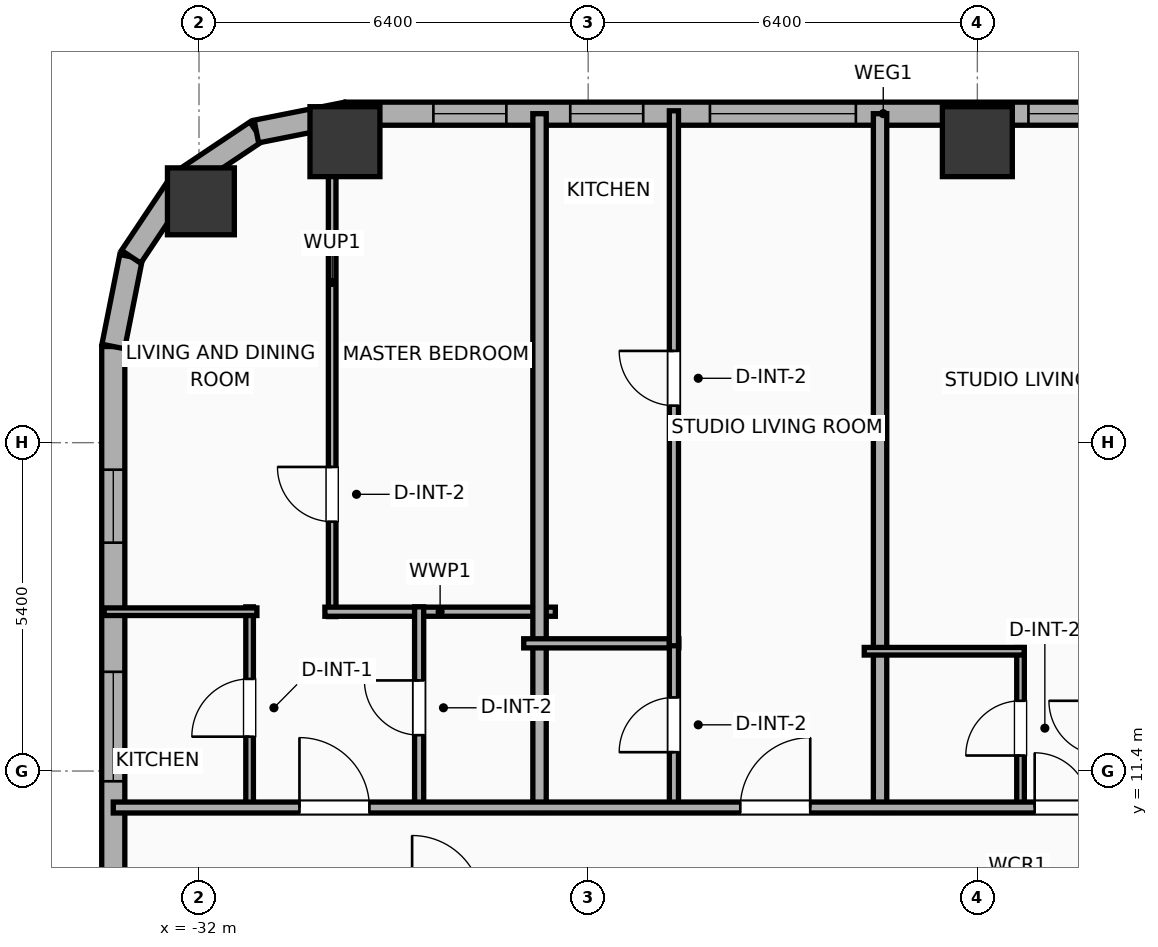
"""IFC4 building model, lengths in metres.
Left out: names, types, materials, properties, quantities, classifications, styles, units other than length and angle.
Written with IfcOpenShell. Run it as: python <this file> out.ifc"""

import sys

from ifc_helpers import new_model, si_unit, direction, frame, frame_2d, origin, origin_2d, place, context, subcontext, project, spatial, rectangle, hollow_rectangle, hollow_circle, extrude, element, fill, save


model = new_model("IFC4")
c1 = context("Model", 3, precision=1e-05, world=origin(), true_north=direction((0.0, 1.0)))
c2 = subcontext(c1, "Body", "Model", "MODEL_VIEW")
j1 = project(units=[si_unit("LENGTHUNIT", "METRE"), si_unit("PLANEANGLEUNIT", "RADIAN")], contexts=[c1])
p1 = place(None, origin())
s1 = spatial("IfcSite", under=j1, at=p1, CompositionType="ELEMENT")
p2 = place(p1, origin())
s2 = spatial("IfcBuilding", under=s1, at=p2, CompositionType="ELEMENT")
p3 = place(p2, frame((0.0, 0.0, 61.1)))
s3 = spatial("IfcBuildingStorey", under=s2, at=p3, CompositionType="ELEMENT", Elevation=61.1)
for number, where, z_axis, x_axis in (
    (1, (-19.2, 21.75, 0.0), (0.0, 0.0, 1.0), (1.0, 0.0, 0.0)),
    (2, (-29.6, 21.75, 0.0), (0.0, 0.0, 1.0), (1.0, 0.0, 0.0)),
):
    element("IfcColumn", number, at=place(p3, frame(where, z_axis=z_axis, x_axis=x_axis)), inside=s3, PredefinedType="COLUMN", context=c2, shape_type="SweptSolid", body=[
        extrude(hollow_rectangle(XDim=1.15, YDim=1.15, WallThickness=0.04, at=origin_2d()), origin(), (0.0, 0.0, 1.0), 3.9),
    ])
p4 = place(p3, frame((-31.969, 20.769, 0.0), z_axis=(0.0, 0.0, 1.0), x_axis=(1.0, 0.0, 0.0)))
e3 = element("IfcColumn", 3, at=p4, inside=s3, PredefinedType="COLUMN", context=c2, shape_type="SweptSolid", body=[
    extrude(hollow_circle(Radius=0.55, WallThickness=0.036, at=origin_2d()), origin(), (0.0, 0.0, 1.0), 3.9),
])
p5 = place(p3, frame((-33.41, 5.882, 0.0), z_axis=(0.0, 0.0, 1.0), x_axis=(0.0, 1.0, 0.0)))
e4 = element("IfcWall", 4, at=p5, inside=s3, PredefinedType="ELEMENTEDWALL", context=c2, shape_type="SweptSolid", body=[
    extrude(rectangle(XDim=12.499, YDim=0.38, at=frame_2d((6.25, 0.0))), origin(), (0.0, 0.0, 1.0), 3.65),
])
p6 = place(p5, frame((5.35, 0.0, 0.75)))
e5 = element("IfcOpeningElement", 5, at=p6, cuts=e4, PredefinedType="OPENING", context=c2, shape_type="SweptSolid", body=[
    extrude(rectangle(XDim=1.8, YDim=2.1, at=frame_2d((0.9, 1.05))), frame((0.0, 0.2, 0.0), z_axis=(0.0, -1.0, 0.0), x_axis=(1.0, 0.0, 0.0)), (0.0, 0.0, 1.0), 0.4),
])
p7 = place(p5, frame((9.274, 0.0, 0.75)))
e6 = element("IfcOpeningElement", 6, at=p7, cuts=e4, PredefinedType="OPENING", context=c2, shape_type="SweptSolid", body=[
    extrude(rectangle(XDim=1.2, YDim=2.05, at=frame_2d((0.6, 1.025))), frame((0.0, 0.2, 0.0), z_axis=(0.0, -1.0, 0.0), x_axis=(1.0, 0.0, 0.0)), (0.0, 0.0, 1.0), 0.4),
])
p8 = place(p3, frame((-33.41, 18.381, 0.0), z_axis=(0.0, 0.0, 1.0), x_axis=(0.195086038585, 0.980786132421, 0.0)))
e7 = element("IfcWall", 7, at=p8, inside=s3, PredefinedType="ELEMENTEDWALL", context=c2, shape_type="SweptSolid", body=[
    extrude(rectangle(XDim=1.504, YDim=0.38, at=frame_2d((0.752, 0.0))), origin(), (0.0, 0.0, 1.0), 3.65),
])
p9 = place(p3, frame((-33.116, 19.857, 0.0), z_axis=(0.0, 0.0, 1.0), x_axis=(0.555572577804, 0.831468045563, 0.0)))
e8 = element("IfcWall", 8, at=p9, inside=s3, PredefinedType="ELEMENTEDWALL", context=c2, shape_type="SweptSolid", body=[
    extrude(rectangle(XDim=1.485, YDim=0.38, at=frame_2d((0.742, 0.0))), origin(), (0.0, 0.0, 1.0), 3.65),
])
p10 = place(p3, frame((-32.292, 21.091, 0.0), z_axis=(0.0, 0.0, 1.0), x_axis=(0.831442848281, 0.555610286119, 0.0)))
e9 = element("IfcWall", 9, at=p10, inside=s3, PredefinedType="ELEMENTEDWALL", context=c2, shape_type="SweptSolid", body=[
    extrude(rectangle(XDim=1.485, YDim=0.38, at=frame_2d((0.743, 0.0))), origin(), (0.0, 0.0, 1.0), 3.65),
])
p11 = place(p3, frame((-31.057, 21.917, 0.0), z_axis=(0.0, 0.0, 1.0), x_axis=(0.980786132421, 0.195086038585, 0.0)))
e10 = element("IfcWall", 10, at=p11, inside=s3, PredefinedType="ELEMENTEDWALL", context=c2, shape_type="SweptSolid", body=[
    extrude(rectangle(XDim=1.504, YDim=0.38, at=frame_2d((0.752, 0.0))), origin(), (0.0, 0.0, 1.0), 3.65),
])
p12 = place(p3, frame((-29.581, 22.21, 0.0), z_axis=(0.0, 0.0, 1.0), x_axis=(1.0, 0.0, 0.0)))
e11 = element("IfcWall", 11, at=p12, inside=s3, PredefinedType="ELEMENTEDWALL", context=c2, shape_type="SweptSolid", body=[
    extrude(rectangle(XDim=17.667, YDim=0.38, at=frame_2d((8.833, 0.0))), origin(), (0.0, 0.0, 1.0), 3.65),
])
p13 = place(p12, frame((5.984, 0.0, 0.75)))
e12 = element("IfcOpeningElement", 12, at=p13, cuts=e11, PredefinedType="OPENING", context=c2, shape_type="SweptSolid", body=[
    extrude(rectangle(XDim=2.4, YDim=2.1, at=frame_2d((1.2, 1.05))), frame((0.0, 0.2, 0.0), z_axis=(0.0, -1.0, 0.0), x_axis=(1.0, 0.0, 0.0)), (0.0, 0.0, 1.0), 0.4),
])
p14 = place(p12, frame((1.436, 0.0, 0.75)))
e13 = element("IfcOpeningElement", 13, at=p14, cuts=e11, PredefinedType="OPENING", context=c2, shape_type="SweptSolid", body=[
    extrude(rectangle(XDim=1.2, YDim=2.05, at=frame_2d((0.6, 1.025))), frame((0.0, 0.2, 0.0), z_axis=(0.0, -1.0, 0.0), x_axis=(1.0, 0.0, 0.0)), (0.0, 0.0, 1.0), 0.4),
])
p15 = place(p12, frame((3.686, 0.0, 0.75)))
e14 = element("IfcOpeningElement", 14, at=p15, cuts=e11, PredefinedType="OPENING", context=c2, shape_type="SweptSolid", body=[
    extrude(rectangle(XDim=1.2, YDim=2.05, at=frame_2d((0.6, 1.025))), frame((0.0, 0.2, 0.0), z_axis=(0.0, -1.0, 0.0), x_axis=(1.0, 0.0, 0.0)), (0.0, 0.0, 1.0), 0.4),
])
p16 = place(p12, frame((11.221, 0.0, 0.75)))
e15 = element("IfcOpeningElement", 15, at=p16, cuts=e11, PredefinedType="OPENING", context=c2, shape_type="SweptSolid", body=[
    extrude(rectangle(XDim=1.2, YDim=2.05, at=frame_2d((0.6, 1.025))), frame((0.0, 0.2, 0.0), z_axis=(0.0, -1.0, 0.0), x_axis=(1.0, 0.0, 0.0)), (0.0, 0.0, 1.0), 0.4),
])
p17 = place(p12, frame((14.886, 0.0, 0.75)))
e16 = element("IfcOpeningElement", 16, at=p17, cuts=e11, PredefinedType="OPENING", context=c2, shape_type="SweptSolid", body=[
    extrude(rectangle(XDim=1.2, YDim=2.05, at=frame_2d((0.6, 1.025))), frame((0.0, 0.2, 0.0), z_axis=(0.0, -1.0, 0.0), x_axis=(1.0, 0.0, 0.0)), (0.0, 0.0, 1.0), 0.4),
])
p18 = place(p3, frame((-29.81, 13.94, 0.0), z_axis=(0.0, 0.0, 1.0), x_axis=(0.0, 1.0, 0.0)))
e17 = element("IfcWall", 17, at=p18, inside=s3, PredefinedType="PARTITIONING", context=c2, shape_type="SweptSolid", body=[
    extrude(rectangle(XDim=8.377, YDim=0.125, at=frame_2d((4.189, 0.0))), origin(), (0.0, 0.0, 1.0), 3.65),
])
p19 = place(p18, frame((1.561, 0.0, 0.0)))
e18 = element("IfcOpeningElement", 18, at=p19, cuts=e17, PredefinedType="OPENING", context=c2, shape_type="SweptSolid", body=[
    extrude(rectangle(XDim=0.9, YDim=2.05, at=frame_2d((0.45, 1.025))), frame((0.0, 0.073, 0.0), z_axis=(0.0, -1.0, 0.0), x_axis=(1.0, 0.0, 0.0)), (0.0, 0.0, 1.0), 0.145),
])
p20 = place(p3, frame((-29.93, 14.02, 0.0), z_axis=(0.0, 0.0, 1.0), x_axis=(1.0, 0.0, 0.0)))
e19 = element("IfcWall", 19, at=p20, inside=s3, PredefinedType="PLUMBINGWALL", context=c2, shape_type="SweptSolid", body=[
    extrude(rectangle(XDim=3.79, YDim=0.15, at=frame_2d((1.895, 0.0))), origin(), (0.0, 0.0, 1.0), 3.65),
])
p21 = place(p3, frame((-31.168, 10.78, 0.0), z_axis=(0.0, 0.0, 1.0), x_axis=(0.0, 1.0, 0.0)))
e20 = element("IfcWall", 20, at=p21, inside=s3, PredefinedType="PARTITIONING", context=c2, shape_type="SweptSolid", body=[
    extrude(rectangle(XDim=3.32, YDim=0.125, at=frame_2d((1.66, 0.0))), origin(), (0.0, 0.0, 1.0), 3.65),
])
p22 = place(p21, frame((1.185, 0.0, 0.0)))
e21 = element("IfcOpeningElement", 21, at=p22, cuts=e20, PredefinedType="OPENING", context=c2, shape_type="SweptSolid", body=[
    extrude(rectangle(XDim=0.95, YDim=2.05, at=frame_2d((0.475, 1.025))), frame((0.0, 0.073, 0.0), z_axis=(0.0, -1.0, 0.0), x_axis=(1.0, 0.0, 0.0)), (0.0, 0.0, 1.0), 0.145),
])
p23 = place(p3, frame((-33.56, 14.02, 0.0), z_axis=(0.0, 0.0, 1.0), x_axis=(1.0, 0.0, 0.0)))
e22 = element("IfcWall", 22, at=p23, inside=s3, PredefinedType="PARTITIONING", context=c2, shape_type="SweptSolid", body=[
    extrude(rectangle(XDim=2.512, YDim=0.125, at=frame_2d((1.256, 0.0))), origin(), (0.0, 0.0, 1.0), 3.65),
])
p24 = place(p3, frame((-28.38, 10.78, 0.0), z_axis=(0.0, 0.0, 1.0), x_axis=(0.0, 1.0, 0.0)))
e23 = element("IfcWall", 23, at=p24, inside=s3, PredefinedType="PLUMBINGWALL", context=c2, shape_type="SweptSolid", body=[
    extrude(rectangle(XDim=3.32, YDim=0.15, at=frame_2d((1.66, 0.0))), origin(), (0.0, 0.0, 1.0), 3.65),
])
p25 = place(p24, frame((1.21, 0.0, 0.0)))
e24 = element("IfcOpeningElement", 24, at=p25, cuts=e23, PredefinedType="OPENING", context=c2, shape_type="SweptSolid", body=[
    extrude(rectangle(XDim=0.9, YDim=2.05, at=frame_2d((0.45, 1.025))), frame((0.0, 0.085, 0.0), z_axis=(0.0, -1.0, 0.0), x_axis=(1.0, 0.0, 0.0)), (0.0, 0.0, 1.0), 0.17),
])
p26 = place(p3, frame((-26.4, 10.72, 0.0), z_axis=(0.0, 0.0, 1.0), x_axis=(0.0, 1.0, 0.0)))
e25 = element("IfcWall", 25, at=p26, inside=s3, PredefinedType="PARTITIONING", context=c2, shape_type="SweptSolid", body=[
    extrude(rectangle(XDim=11.49, YDim=0.22, at=frame_2d((5.745, 0.0))), origin(), (0.0, 0.0, 1.0), 3.65),
])
p27 = place(p3, frame((-26.66, 13.5, 0.0), z_axis=(0.0, 0.0, 1.0), x_axis=(1.0, 0.0, 0.0)))
e26 = element("IfcWall", 26, at=p27, inside=s3, PredefinedType="PLUMBINGWALL", context=c2, shape_type="SweptSolid", body=[
    extrude(rectangle(XDim=2.55, YDim=0.15, at=frame_2d((1.275, 0.0))), origin(), (0.0, 0.0, 1.0), 3.65),
])
p28 = place(p3, frame((-24.19, 10.78, 0.0), z_axis=(0.0, 0.0, 1.0), x_axis=(0.0, 1.0, 0.0)))
e27 = element("IfcWall", 27, at=p28, inside=s3, PredefinedType="PLUMBINGWALL", context=c2, shape_type="SweptSolid", body=[
    extrude(rectangle(XDim=2.76, YDim=0.15, at=frame_2d((1.38, 0.0))), origin(), (0.0, 0.0, 1.0), 3.65),
])
p29 = place(p28, frame((0.93, 0.0, 0.0)))
e28 = element("IfcOpeningElement", 28, at=p29, cuts=e27, PredefinedType="OPENING", context=c2, shape_type="SweptSolid", body=[
    extrude(rectangle(XDim=0.9, YDim=2.05, at=frame_2d((0.45, 1.025))), frame((0.0, 0.085, 0.0), z_axis=(0.0, -1.0, 0.0), x_axis=(1.0, 0.0, 0.0)), (0.0, 0.0, 1.0), 0.17),
])
p30 = place(p3, frame((-24.19, 13.46, 0.0), z_axis=(0.0, 0.0, 1.0), x_axis=(0.0, 1.0, 0.0)))
e29 = element("IfcWall", 29, at=p30, inside=s3, PredefinedType="PLUMBINGWALL", context=c2, shape_type="SweptSolid", body=[
    extrude(rectangle(XDim=8.798, YDim=0.15, at=frame_2d((4.399, 0.0))), origin(), (0.0, 0.0, 1.0), 3.65),
])
p31 = place(p30, frame((3.949, 0.0, 0.0)))
e30 = element("IfcOpeningElement", 30, at=p31, cuts=e29, PredefinedType="OPENING", context=c2, shape_type="SweptSolid", body=[
    extrude(rectangle(XDim=0.9, YDim=2.05, at=frame_2d((0.45, 1.025))), frame((0.0, 0.085, 0.0), z_axis=(0.0, -1.0, 0.0), x_axis=(1.0, 0.0, 0.0)), (0.0, 0.0, 1.0), 0.17),
])
p32 = place(p3, frame((-20.8, 10.72, 0.0), z_axis=(0.0, 0.0, 1.0), x_axis=(0.0, 1.0, 0.0)))
e31 = element("IfcWall", 31, at=p32, inside=s3, PredefinedType="PARTITIONING", context=c2, shape_type="SweptSolid", body=[
    extrude(rectangle(XDim=11.49, YDim=0.22, at=frame_2d((5.745, 0.0))), origin(), (0.0, 0.0, 1.0), 3.65),
])
p33 = place(p3, frame((-18.49, 10.78, 0.0), z_axis=(0.0, 0.0, 1.0), x_axis=(0.0, 1.0, 0.0)))
e32 = element("IfcWall", 32, at=p33, inside=s3, PredefinedType="PARTITIONING", context=c2, shape_type="SweptSolid", body=[
    extrude(rectangle(XDim=2.65, YDim=0.125, at=frame_2d((1.325, 0.0))), origin(), (0.0, 0.0, 1.0), 3.65),
])
p34 = place(p33, frame((0.875, 0.0, 0.0)))
e33 = element("IfcOpeningElement", 33, at=p34, cuts=e32, PredefinedType="OPENING", context=c2, shape_type="SweptSolid", body=[
    extrude(rectangle(XDim=0.9, YDim=2.05, at=frame_2d((0.45, 1.025))), frame((0.0, 0.073, 0.0), z_axis=(0.0, -1.0, 0.0), x_axis=(1.0, 0.0, 0.0)), (0.0, 0.0, 1.0), 0.145),
])
p35 = place(p3, frame((-21.06, 13.37, 0.0), z_axis=(0.0, 0.0, 1.0), x_axis=(1.0, 0.0, 0.0)))
e34 = element("IfcWall", 34, at=p35, inside=s3, PredefinedType="PARTITIONING", context=c2, shape_type="SweptSolid", body=[
    extrude(rectangle(XDim=2.63, YDim=0.125, at=frame_2d((1.315, 0.0))), origin(), (0.0, 0.0, 1.0), 3.65),
])
p36 = place(p3, frame((-33.41, 10.8, 0.0), z_axis=(0.0, 0.0, 1.0), x_axis=(1.0, 0.0, 0.0)))
e35 = element("IfcWall", 35, at=p36, inside=s3, PredefinedType="PARTITIONING", context=c2, shape_type="SweptSolid", body=[
    extrude(rectangle(XDim=59.62, YDim=0.18, at=frame_2d((29.81, 0.0))), origin(), (0.0, 0.0, 1.0), 3.65),
])
p37 = place(p36, frame((3.062, 0.0, 0.0)))
e36 = element("IfcOpeningElement", 36, at=p37, cuts=e35, PredefinedType="OPENING", context=c2, shape_type="SweptSolid", body=[
    extrude(rectangle(XDim=1.15, YDim=2.05, at=frame_2d((0.575, 1.025))), frame((0.0, 0.1, 0.0), z_axis=(0.0, -1.0, 0.0), x_axis=(1.0, 0.0, 0.0)), (0.0, 0.0, 1.0), 0.2),
])
p38 = place(p36, frame((10.312, 0.0, 0.0)))
e37 = element("IfcOpeningElement", 37, at=p38, cuts=e35, PredefinedType="OPENING", context=c2, shape_type="SweptSolid", body=[
    extrude(rectangle(XDim=1.15, YDim=2.05, at=frame_2d((0.575, 1.025))), frame((0.0, 0.1, 0.0), z_axis=(0.0, -1.0, 0.0), x_axis=(1.0, 0.0, 0.0)), (0.0, 0.0, 1.0), 0.2),
])
p39 = place(p36, frame((15.153, 0.0, 0.0)))
e38 = element("IfcOpeningElement", 38, at=p39, cuts=e35, PredefinedType="OPENING", context=c2, shape_type="SweptSolid", body=[
    extrude(rectangle(XDim=0.9, YDim=2.05, at=frame_2d((0.45, 1.025))), frame((0.0, 0.1, 0.0), z_axis=(0.0, -1.0, 0.0), x_axis=(1.0, 0.0, 0.0)), (0.0, 0.0, 1.0), 0.2),
])
p40 = place(p36, frame((21.508, 0.0, 0.0)))
e39 = element("IfcOpeningElement", 39, at=p40, cuts=e35, PredefinedType="OPENING", context=c2, shape_type="SweptSolid", body=[
    extrude(rectangle(XDim=1.15, YDim=2.05, at=frame_2d((0.575, 1.025))), frame((0.0, 0.1, 0.0), z_axis=(0.0, -1.0, 0.0), x_axis=(1.0, 0.0, 0.0)), (0.0, 0.0, 1.0), 0.2),
])
p41 = place(p36, frame((26.355, 0.0, 0.0)))
e40 = element("IfcOpeningElement", 40, at=p41, cuts=e35, PredefinedType="OPENING", context=c2, shape_type="SweptSolid", body=[
    extrude(rectangle(XDim=0.9, YDim=2.05, at=frame_2d((0.45, 1.025))), frame((0.0, 0.1, 0.0), z_axis=(0.0, -1.0, 0.0), x_axis=(1.0, 0.0, 0.0)), (0.0, 0.0, 1.0), 0.2),
])
p42 = place(p36, frame((32.753, 0.0, 0.0)))
e41 = element("IfcOpeningElement", 41, at=p42, cuts=e35, PredefinedType="OPENING", context=c2, shape_type="SweptSolid", body=[
    extrude(rectangle(XDim=1.15, YDim=2.05, at=frame_2d((0.575, 1.025))), frame((0.0, 0.1, 0.0), z_axis=(0.0, -1.0, 0.0), x_axis=(1.0, 0.0, 0.0)), (0.0, 0.0, 1.0), 0.2),
])
p43 = place(p36, frame((36.163, 0.0, 0.0)))
e42 = element("IfcOpeningElement", 42, at=p43, cuts=e35, PredefinedType="OPENING", context=c2, shape_type="SweptSolid", body=[
    extrude(rectangle(XDim=1.15, YDim=2.05, at=frame_2d((0.575, 1.025))), frame((0.0, 0.1, 0.0), z_axis=(0.0, -1.0, 0.0), x_axis=(1.0, 0.0, 0.0)), (0.0, 0.0, 1.0), 0.2),
])
p44 = place(p36, frame((43.156, 0.0, 0.0)))
e43 = element("IfcOpeningElement", 43, at=p44, cuts=e35, PredefinedType="OPENING", context=c2, shape_type="SweptSolid", body=[
    extrude(rectangle(XDim=0.9, YDim=2.05, at=frame_2d((0.45, 1.025))), frame((0.0, 0.1, 0.0), z_axis=(0.0, -1.0, 0.0), x_axis=(1.0, 0.0, 0.0)), (0.0, 0.0, 1.0), 0.2),
])
p45 = place(p36, frame((47.36, 0.0, 0.0)))
e44 = element("IfcOpeningElement", 44, at=p45, cuts=e35, PredefinedType="OPENING", context=c2, shape_type="SweptSolid", body=[
    extrude(rectangle(XDim=1.15, YDim=2.05, at=frame_2d((0.575, 1.025))), frame((0.0, 0.1, 0.0), z_axis=(0.0, -1.0, 0.0), x_axis=(1.0, 0.0, 0.0)), (0.0, 0.0, 1.0), 0.2),
])
p46 = place(p36, frame((55.337, 0.0, 0.0)))
e45 = element("IfcOpeningElement", 45, at=p46, cuts=e35, PredefinedType="OPENING", context=c2, shape_type="SweptSolid", body=[
    extrude(rectangle(XDim=1.15, YDim=2.05, at=frame_2d((0.575, 1.025))), frame((0.0, 0.1, 0.0), z_axis=(0.0, -1.0, 0.0), x_axis=(1.0, 0.0, 0.0)), (0.0, 0.0, 1.0), 0.2),
])
p47 = place(p6, origin())
e46 = element("IfcWindow", 46, at=p47, inside=s3, PartitioningType="SINGLE_PANEL", PredefinedType="WINDOW", context=c2, shape_type="SweptSolid", body=[
    extrude(rectangle(XDim=1.8, YDim=2.1, at=frame_2d((0.9, 1.05))), frame((0.0, 0.03, 0.0), z_axis=(0.0, -1.0, 0.0), x_axis=(1.0, 0.0, 0.0)), (0.0, 0.0, 1.0), 0.06),
])
fill(e5, e46)
p48 = place(p13, origin())
e47 = element("IfcWindow", 47, at=p48, inside=s3, PartitioningType="SINGLE_PANEL", PredefinedType="WINDOW", context=c2, shape_type="SweptSolid", body=[
    extrude(rectangle(XDim=2.4, YDim=2.1, at=frame_2d((1.2, 1.05))), frame((0.0, 0.03, 0.0), z_axis=(0.0, -1.0, 0.0), x_axis=(1.0, 0.0, 0.0)), (0.0, 0.0, 1.0), 0.06),
])
fill(e12, e47)
p49 = place(p7, origin())
e48 = element("IfcWindow", 48, at=p49, inside=s3, PartitioningType="SINGLE_PANEL", PredefinedType="WINDOW", context=c2, shape_type="SweptSolid", body=[
    extrude(rectangle(XDim=1.2, YDim=2.05, at=frame_2d((0.6, 1.025))), frame((0.0, 0.03, 0.0), z_axis=(0.0, -1.0, 0.0), x_axis=(1.0, 0.0, 0.0)), (0.0, 0.0, 1.0), 0.06),
])
fill(e6, e48)
p50 = place(p14, origin())
e49 = element("IfcWindow", 49, at=p50, inside=s3, PartitioningType="SINGLE_PANEL", PredefinedType="WINDOW", context=c2, shape_type="SweptSolid", body=[
    extrude(rectangle(XDim=1.2, YDim=2.05, at=frame_2d((0.6, 1.025))), frame((0.0, 0.03, 0.0), z_axis=(0.0, -1.0, 0.0), x_axis=(1.0, 0.0, 0.0)), (0.0, 0.0, 1.0), 0.06),
])
fill(e13, e49)
p51 = place(p15, origin())
e50 = element("IfcWindow", 50, at=p51, inside=s3, PartitioningType="SINGLE_PANEL", PredefinedType="WINDOW", context=c2, shape_type="SweptSolid", body=[
    extrude(rectangle(XDim=1.2, YDim=2.05, at=frame_2d((0.6, 1.025))), frame((0.0, 0.03, 0.0), z_axis=(0.0, -1.0, 0.0), x_axis=(1.0, 0.0, 0.0)), (0.0, 0.0, 1.0), 0.06),
])
fill(e14, e50)
p52 = place(p16, origin())
e51 = element("IfcWindow", 51, at=p52, inside=s3, PartitioningType="SINGLE_PANEL", PredefinedType="WINDOW", context=c2, shape_type="SweptSolid", body=[
    extrude(rectangle(XDim=1.2, YDim=2.05, at=frame_2d((0.6, 1.025))), frame((0.0, 0.03, 0.0), z_axis=(0.0, -1.0, 0.0), x_axis=(1.0, 0.0, 0.0)), (0.0, 0.0, 1.0), 0.06),
])
fill(e15, e51)
p53 = place(p19, origin())
e52 = element("IfcDoor", 52, at=p53, inside=s3, OperationType="SINGLE_SWING_RIGHT", PredefinedType="DOOR", context=c2, shape_type="SweptSolid", body=[
    extrude(rectangle(XDim=0.9, YDim=2.05, at=frame_2d((0.45, 1.025))), frame((0.0, 0.025, 0.0), z_axis=(0.0, -1.0, 0.0), x_axis=(1.0, 0.0, 0.0)), (0.0, 0.0, 1.0), 0.05),
])
fill(e18, e52)
p54 = place(p22, origin())
e53 = element("IfcDoor", 53, at=p54, inside=s3, OperationType="SINGLE_SWING_LEFT", PredefinedType="DOOR", context=c2, shape_type="SweptSolid", body=[
    extrude(rectangle(XDim=0.95, YDim=2.05, at=frame_2d((0.475, 1.025))), frame((0.0, 0.025, 0.0), z_axis=(0.0, -1.0, 0.0), x_axis=(1.0, 0.0, 0.0)), (0.0, 0.0, 1.0), 0.05),
])
fill(e21, e53)
p55 = place(p25, origin())
e54 = element("IfcDoor", 54, at=p55, inside=s3, OperationType="SINGLE_SWING_RIGHT", PredefinedType="DOOR", context=c2, shape_type="SweptSolid", body=[
    extrude(rectangle(XDim=0.9, YDim=2.05, at=frame_2d((0.45, 1.025))), frame((0.0, 0.025, 0.0), z_axis=(0.0, -1.0, 0.0), x_axis=(1.0, 0.0, 0.0)), (0.0, 0.0, 1.0), 0.05),
])
fill(e24, e54)
p56 = place(p29, origin())
e55 = element("IfcDoor", 55, at=p56, inside=s3, OperationType="SINGLE_SWING_LEFT", PredefinedType="DOOR", context=c2, shape_type="SweptSolid", body=[
    extrude(rectangle(XDim=0.9, YDim=2.05, at=frame_2d((0.45, 1.025))), frame((0.0, 0.025, 0.0), z_axis=(0.0, -1.0, 0.0), x_axis=(1.0, 0.0, 0.0)), (0.0, 0.0, 1.0), 0.05),
])
fill(e28, e55)
p57 = place(p31, origin())
e56 = element("IfcDoor", 56, at=p57, inside=s3, OperationType="SINGLE_SWING_RIGHT", PredefinedType="DOOR", context=c2, shape_type="SweptSolid", body=[
    extrude(rectangle(XDim=0.9, YDim=2.05, at=frame_2d((0.45, 1.025))), frame((0.0, 0.025, 0.0), z_axis=(0.0, -1.0, 0.0), x_axis=(1.0, 0.0, 0.0)), (0.0, 0.0, 1.0), 0.05),
])
fill(e30, e56)
p58 = place(p34, origin())
e57 = element("IfcDoor", 57, at=p58, inside=s3, OperationType="SINGLE_SWING_LEFT", PredefinedType="DOOR", context=c2, shape_type="SweptSolid", body=[
    extrude(rectangle(XDim=0.9, YDim=2.05, at=frame_2d((0.45, 1.025))), frame((0.0, 0.025, 0.0), z_axis=(0.0, -1.0, 0.0), x_axis=(1.0, 0.0, 0.0)), (0.0, 0.0, 1.0), 0.05),
])
fill(e33, e57)
p59 = place(p37, origin())
e58 = element("IfcDoor", 58, at=p59, inside=s3, OperationType="SINGLE_SWING_LEFT", PredefinedType="DOOR", context=c2, shape_type="SweptSolid", body=[
    extrude(rectangle(XDim=1.15, YDim=2.05, at=frame_2d((0.575, 1.025))), frame((0.0, 0.025, 0.0), z_axis=(0.0, -1.0, 0.0), x_axis=(1.0, 0.0, 0.0)), (0.0, 0.0, 1.0), 0.05),
])
fill(e36, e58)
p60 = place(p38, origin())
e59 = element("IfcDoor", 59, at=p60, inside=s3, OperationType="SINGLE_SWING_RIGHT", PredefinedType="DOOR", context=c2, shape_type="SweptSolid", body=[
    extrude(rectangle(XDim=1.15, YDim=2.05, at=frame_2d((0.575, 1.025))), frame((0.0, 0.025, 0.0), z_axis=(0.0, -1.0, 0.0), x_axis=(1.0, 0.0, 0.0)), (0.0, 0.0, 1.0), 0.05),
])
fill(e37, e59)
p61 = place(p39, origin())
e60 = element("IfcDoor", 60, at=p61, inside=s3, OperationType="SINGLE_SWING_LEFT", PredefinedType="DOOR", context=c2, shape_type="SweptSolid", body=[
    extrude(rectangle(XDim=0.9, YDim=2.05, at=frame_2d((0.45, 1.025))), frame((0.0, 0.025, 0.0), z_axis=(0.0, -1.0, 0.0), x_axis=(1.0, 0.0, 0.0)), (0.0, 0.0, 1.0), 0.05),
])
fill(e38, e60)
save(model, sys.argv[1])
